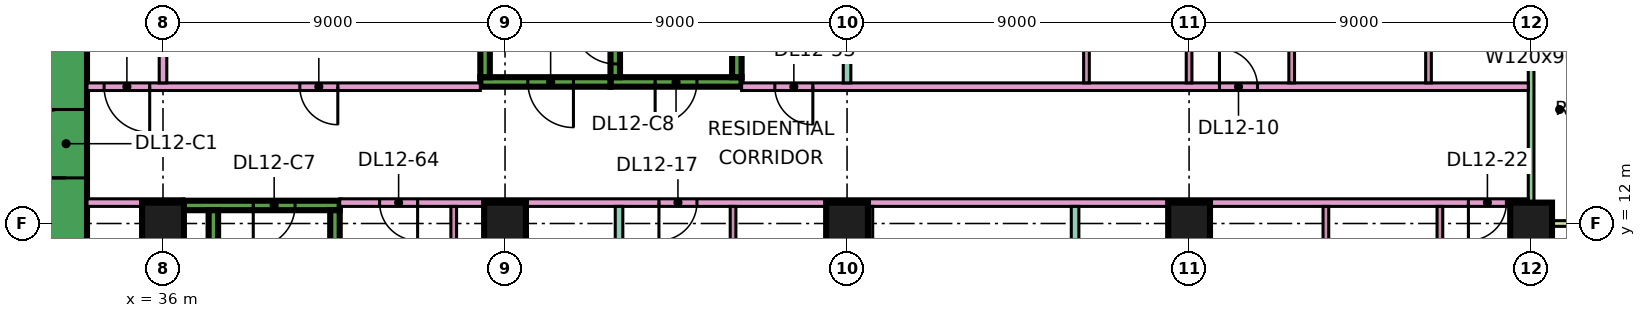
"""IFC4 building model, lengths in metres.
Left out: names, types, materials, properties, quantities, classifications, styles, units other than length and angle.
Written with IfcOpenShell. Run it as: python <this file> out.ifc"""

import sys

from ifc_helpers import new_model, si_unit, direction, frame, frame_2d, origin, origin_2d, place, context, subcontext, project, spatial, rectangle, extrude, element, fill, save


model = new_model("IFC4")
c1 = context("Model", 3, precision=1e-05, world=origin(), true_north=direction((0.0, 1.0)))
c2 = subcontext(c1, "Body", "Model", "MODEL_VIEW")
j1 = project(units=[si_unit("LENGTHUNIT", "METRE"), si_unit("PLANEANGLEUNIT", "RADIAN")], contexts=[c1])
p1 = place(None, origin())
s1 = spatial("IfcSite", under=j1, at=p1, CompositionType="ELEMENT")
p2 = place(p1, origin())
s2 = spatial("IfcBuilding", under=s1, at=p2, CompositionType="ELEMENT")
p3 = place(p2, frame((0.0, 0.0, 60.15)))
s3 = spatial("IfcBuildingStorey", under=s2, at=p3, CompositionType="ELEMENT", Elevation=60.15)
for number, where, z_axis, x_axis in (
    (1, (36.0, 12.0, 0.0), (0.0, 0.0, 1.0), (1.0, 0.0, 0.0)),
    (2, (45.0, 12.0, 0.0), (0.0, 0.0, 1.0), (1.0, 0.0, 0.0)),
    (3, (54.0, 12.0, 0.0), (0.0, 0.0, 1.0), (1.0, 0.0, 0.0)),
    (4, (63.0, 12.0, 0.0), (0.0, 0.0, 1.0), (1.0, 0.0, 0.0)),
    (5, (72.0, 12.0, 0.0), (0.0, 0.0, 1.0), (1.0, 0.0, 0.0)),
):
    element("IfcColumn", number, at=place(p3, frame(where, z_axis=z_axis, x_axis=x_axis)), inside=s3, PredefinedType="COLUMN", context=c2, shape_type="SweptSolid", body=[
        extrude(rectangle(XDim=1.1, YDim=1.1, at=origin_2d()), origin(), (0.0, 0.0, 1.0), 3.75),
    ])
p4 = place(p3, frame((33.45, 8.1, 0.0), z_axis=(0.0, 0.0, 1.0), x_axis=(0.0, 1.0, 0.0)))
e6 = element("IfcWall", 6, at=p4, inside=s3, PredefinedType="SHEAR", context=c2, shape_type="SweptSolid", body=[
    extrude(rectangle(XDim=10.8, YDim=1.1, at=frame_2d((5.4, 0.0))), origin(), (0.0, 0.0, 1.0), 3.75),
])
p5 = place(p4, frame((5.1, 0.0, 0.0)))
e7 = element("IfcOpeningElement", 7, at=p5, cuts=e6, PredefinedType="OPENING", context=c2, shape_type="SweptSolid", body=[
    extrude(rectangle(XDim=1.8, YDim=2.4, at=frame_2d((0.9, 1.2))), frame((0.0, 0.56, 0.0), z_axis=(0.0, -1.0, 0.0), x_axis=(1.0, 0.0, 0.0)), (0.0, 0.0, 1.0), 1.12),
])
p6 = place(p3, frame((36.55, 12.475, 0.0), z_axis=(0.0, 0.0, 1.0), x_axis=(1.0, 0.0, 0.0)))
e8 = element("IfcWall", 8, at=p6, inside=s3, PredefinedType="SHEAR", context=c2, shape_type="SweptSolid", body=[
    extrude(rectangle(XDim=4.1, YDim=0.25, at=frame_2d((2.05, 0.0))), origin(), (0.0, 0.0, 1.0), 3.75),
])
p7 = place(p6, frame((1.825, 0.0, 0.0)))
e9 = element("IfcOpeningElement", 9, at=p7, cuts=e8, PredefinedType="OPENING", context=c2, shape_type="SweptSolid", body=[
    extrude(rectangle(XDim=1.1, YDim=2.2, at=frame_2d((0.55, 1.1))), frame((0.0, 0.135, 0.0), z_axis=(0.0, -1.0, 0.0), x_axis=(1.0, 0.0, 0.0)), (0.0, 0.0, 1.0), 0.27),
])
for number, where, z_axis, x_axis in (
    (10, (37.325, 5.85, 0.0), (0.0, 0.0, 1.0), (0.0, 1.0, 0.0)),
    (11, (40.525, 5.85, 0.0), (0.0, 0.0, 1.0), (0.0, 1.0, 0.0)),
):
    element("IfcWall", number, at=place(p3, frame(where, z_axis=z_axis, x_axis=x_axis)), inside=s3, PredefinedType="SHEAR", context=c2, shape_type="SweptSolid", body=[
        extrude(rectangle(XDim=6.5, YDim=0.25, at=frame_2d((3.25, 0.0))), origin(), (0.0, 0.0, 1.0), 3.75),
    ])
p8 = place(p3, frame((47.775, 15.725, 0.0), z_axis=(0.0, 0.0, 1.0), x_axis=(1.0, 0.0, 0.0)))
e12 = element("IfcWall", 12, at=p8, inside=s3, PredefinedType="SHEAR", context=c2, shape_type="SweptSolid", body=[
    extrude(rectangle(XDim=3.45, YDim=0.25, at=frame_2d((1.725, 0.0))), origin(), (0.0, 0.0, 1.0), 3.75),
])
p9 = place(p8, frame((1.175, 0.0, 0.0)))
e13 = element("IfcOpeningElement", 13, at=p9, cuts=e12, PredefinedType="OPENING", context=c2, shape_type="SweptSolid", body=[
    extrude(rectangle(XDim=1.1, YDim=2.2, at=frame_2d((0.55, 1.1))), frame((0.0, 0.135, 0.0), z_axis=(0.0, -1.0, 0.0), x_axis=(1.0, 0.0, 0.0)), (0.0, 0.0, 1.0), 0.27),
])
p10 = place(p3, frame((47.9, 15.85, 0.0), z_axis=(0.0, 0.0, 1.0), x_axis=(0.0, 1.0, 0.0)))
e14 = element("IfcWall", 14, at=p10, inside=s3, PredefinedType="SHEAR", context=c2, shape_type="SweptSolid", body=[
    extrude(rectangle(XDim=6.5, YDim=0.25, at=frame_2d((3.25, 0.0))), origin(), (0.0, 0.0, 1.0), 3.75),
])
p11 = place(p10, frame((0.35, 0.0, 0.0)))
e15 = element("IfcOpeningElement", 15, at=p11, cuts=e14, PredefinedType="OPENING", context=c2, shape_type="SweptSolid", body=[
    extrude(rectangle(XDim=1.1, YDim=2.2, at=frame_2d((0.55, 1.1))), frame((0.0, 0.135, 0.0), z_axis=(0.0, -1.0, 0.0), x_axis=(1.0, 0.0, 0.0)), (0.0, 0.0, 1.0), 0.27),
])
p12 = place(p3, frame((51.1, 15.85, 0.0), z_axis=(0.0, 0.0, 1.0), x_axis=(0.0, 1.0, 0.0)))
e16 = element("IfcWall", 16, at=p12, inside=s3, PredefinedType="SHEAR", context=c2, shape_type="SweptSolid", body=[
    extrude(rectangle(XDim=6.5, YDim=0.25, at=frame_2d((3.25, 0.0))), origin(), (0.0, 0.0, 1.0), 3.75),
])
p13 = place(p3, frame((44.35, 15.725, 0.0), z_axis=(0.0, 0.0, 1.0), x_axis=(1.0, 0.0, 0.0)))
e17 = element("IfcWall", 17, at=p13, inside=s3, PredefinedType="SHEAR", context=c2, shape_type="SweptSolid", body=[
    extrude(rectangle(XDim=3.425, YDim=0.25, at=frame_2d((1.712, 0.0))), origin(), (0.0, 0.0, 1.0), 3.75),
])
p14 = place(p13, frame((1.25, 0.0, 0.0)))
e18 = element("IfcOpeningElement", 18, at=p14, cuts=e17, PredefinedType="OPENING", context=c2, shape_type="SweptSolid", body=[
    extrude(rectangle(XDim=1.2, YDim=2.2, at=frame_2d((0.6, 1.1))), frame((0.0, 0.135, 0.0), z_axis=(0.0, -1.0, 0.0), x_axis=(1.0, 0.0, 0.0)), (0.0, 0.0, 1.0), 0.27),
])
p15 = place(p3, frame((44.475, 15.85, 0.0), z_axis=(0.0, 0.0, 1.0), x_axis=(0.0, 1.0, 0.0)))
e19 = element("IfcWall", 19, at=p15, inside=s3, PredefinedType="SHEAR", context=c2, shape_type="SweptSolid", body=[
    extrude(rectangle(XDim=6.5, YDim=0.25, at=frame_2d((3.25, 0.0))), origin(), (0.0, 0.0, 1.0), 3.75),
])
p16 = place(p15, frame((1.75, 0.0, 0.0)))
e20 = element("IfcOpeningElement", 20, at=p16, cuts=e19, PredefinedType="OPENING", context=c2, shape_type="SweptSolid", body=[
    extrude(rectangle(XDim=1.1, YDim=2.2, at=frame_2d((0.55, 1.1))), frame((0.0, 0.135, 0.0), z_axis=(0.0, -1.0, 0.0), x_axis=(1.0, 0.0, 0.0)), (0.0, 0.0, 1.0), 0.27),
])
p17 = place(p15, frame((4.3, 0.0, 0.0)))
e21 = element("IfcOpeningElement", 21, at=p17, cuts=e19, PredefinedType="OPENING", context=c2, shape_type="SweptSolid", body=[
    extrude(rectangle(XDim=1.1, YDim=2.2, at=frame_2d((0.55, 1.1))), frame((0.0, 0.135, 0.0), z_axis=(0.0, -1.0, 0.0), x_axis=(1.0, 0.0, 0.0)), (0.0, 0.0, 1.0), 0.27),
])
p18 = place(p3, frame((72.0, 12.075, 0.0), z_axis=(0.0, 0.0, 1.0), x_axis=(0.0, 1.0, 0.0)))
e22 = element("IfcWall", 22, at=p18, inside=s3, PredefinedType="SOLIDWALL", context=c2, shape_type="SweptSolid", body=[
    extrude(rectangle(XDim=10.35, YDim=0.15, at=frame_2d((5.175, 0.0))), origin(), (0.0, 0.0, 1.0), 3.35),
])
p19 = place(p18, frame((4.275, 0.0, 1.7)))
e23 = element("IfcOpeningElement", 23, at=p19, cuts=e22, PredefinedType="OPENING", context=c2, shape_type="SweptSolid", body=[
    extrude(rectangle(XDim=1.2, YDim=0.9, at=frame_2d((0.6, 0.45))), frame((0.0, 0.085, 0.0), z_axis=(0.0, -1.0, 0.0), x_axis=(1.0, 0.0, 0.0)), (0.0, 0.0, 1.0), 0.17),
])
p20 = place(p18, frame((7.988, 0.0, 0.45)))
e24 = element("IfcOpeningElement", 24, at=p20, cuts=e22, PredefinedType="OPENING", context=c2, shape_type="SweptSolid", body=[
    extrude(rectangle(XDim=1.8, YDim=2.4, at=frame_2d((0.9, 1.2))), frame((0.0, 0.085, 0.0), z_axis=(0.0, -1.0, 0.0), x_axis=(1.0, 0.0, 0.0)), (0.0, 0.0, 1.0), 0.17),
])
p21 = place(p3, frame((73.5, 12.0, 0.0), z_axis=(0.0, 0.0, 1.0), x_axis=(-1.0, 0.0, 0.0)))
e25 = element("IfcWall", 25, at=p21, inside=s3, PredefinedType="SOLIDWALL", context=c2, shape_type="SweptSolid", body=[
    extrude(rectangle(XDim=1.5, YDim=0.15, at=frame_2d((0.75, 0.0))), origin(), (0.0, 0.0, 1.0), 3.35),
])
p22 = place(p3, frame((34.0, 12.55, 0.0), z_axis=(0.0, 0.0, 1.0), x_axis=(1.0, 0.0, 0.0)))
e26 = element("IfcWall", 26, at=p22, inside=s3, PredefinedType="PARTITIONING", context=c2, shape_type="SweptSolid", body=[
    extrude(rectangle(XDim=2.551, YDim=0.2, at=frame_2d((1.275, 0.0))), origin(), (0.0, 0.0, 1.0), 3.35),
])
p23 = place(p3, frame((34.0, 15.6, 0.0), z_axis=(0.0, 0.0, 1.0), x_axis=(1.0, 0.0, 0.0)))
e27 = element("IfcWall", 27, at=p23, inside=s3, PredefinedType="PARTITIONING", context=c2, shape_type="SweptSolid", body=[
    extrude(rectangle(XDim=10.35, YDim=0.2, at=frame_2d((5.175, 0.0))), origin(), (0.0, 0.0, 1.0), 3.35),
])
p24 = place(p23, frame((5.6, 0.0, 0.0)))
e28 = element("IfcOpeningElement", 28, at=p24, cuts=e27, PredefinedType="OPENING", context=c2, shape_type="SweptSolid", body=[
    extrude(rectangle(XDim=1.0, YDim=2.1, at=frame_2d((0.5, 1.05))), frame((0.0, 0.11, 0.0), z_axis=(0.0, -1.0, 0.0), x_axis=(1.0, 0.0, 0.0)), (0.0, 0.0, 1.0), 0.22),
])
p25 = place(p23, frame((0.45, 0.0, 0.0)))
e29 = element("IfcOpeningElement", 29, at=p25, cuts=e27, PredefinedType="OPENING", context=c2, shape_type="SweptSolid", body=[
    extrude(rectangle(XDim=1.2, YDim=2.1, at=frame_2d((0.6, 1.05))), frame((0.0, 0.11, 0.0), z_axis=(0.0, -1.0, 0.0), x_axis=(1.0, 0.0, 0.0)), (0.0, 0.0, 1.0), 0.22),
])
p26 = place(p3, frame((36.0, 15.7, 0.0), z_axis=(0.0, 0.0, 1.0), x_axis=(0.0, 1.0, 0.0)))
e30 = element("IfcWall", 30, at=p26, inside=s3, PredefinedType="PARTITIONING", context=c2, shape_type="SweptSolid", body=[
    extrude(rectangle(XDim=8.3, YDim=0.2, at=frame_2d((4.15, 0.0))), origin(), (0.0, 0.0, 1.0), 3.35),
])
p27 = place(p3, frame((40.65, 12.55, 0.0), z_axis=(0.0, 0.0, 1.0), x_axis=(1.0, 0.0, 0.0)))
e31 = element("IfcWall", 31, at=p27, inside=s3, PredefinedType="PARTITIONING", context=c2, shape_type="SweptSolid", body=[
    extrude(rectangle(XDim=31.276, YDim=0.2, at=frame_2d((15.638, 0.0))), origin(), (0.0, 0.0, 1.0), 3.35),
])
p28 = place(p27, frame((8.4, 0.0, 0.0)))
e32 = element("IfcOpeningElement", 32, at=p28, cuts=e31, PredefinedType="OPENING", context=c2, shape_type="SweptSolid", body=[
    extrude(rectangle(XDim=1.0, YDim=2.1, at=frame_2d((0.5, 1.05))), frame((0.0, 0.11, 0.0), z_axis=(0.0, -1.0, 0.0), x_axis=(1.0, 0.0, 0.0)), (0.0, 0.0, 1.0), 0.22),
])
p29 = place(p27, frame((29.7, 0.0, 0.0)))
e33 = element("IfcOpeningElement", 33, at=p29, cuts=e31, PredefinedType="OPENING", context=c2, shape_type="SweptSolid", body=[
    extrude(rectangle(XDim=1.0, YDim=2.1, at=frame_2d((0.5, 1.05))), frame((0.0, 0.11, 0.0), z_axis=(0.0, -1.0, 0.0), x_axis=(1.0, 0.0, 0.0)), (0.0, 0.0, 1.0), 0.22),
])
p30 = place(p27, frame((1.05, 0.0, 0.0)))
e34 = element("IfcOpeningElement", 34, at=p30, cuts=e31, PredefinedType="OPENING", context=c2, shape_type="SweptSolid", body=[
    extrude(rectangle(XDim=1.0, YDim=2.1, at=frame_2d((0.5, 1.05))), frame((0.0, 0.11, 0.0), z_axis=(0.0, -1.0, 0.0), x_axis=(1.0, 0.0, 0.0)), (0.0, 0.0, 1.0), 0.22),
])
p31 = place(p3, frame((43.65, 5.825, 0.0), z_axis=(0.0, 0.0, 1.0), x_axis=(0.0, 1.0, 0.0)))
e35 = element("IfcWall", 35, at=p31, inside=s3, PredefinedType="PARTITIONING", context=c2, shape_type="SweptSolid", body=[
    extrude(rectangle(XDim=6.625, YDim=0.15, at=frame_2d((3.312, 0.0))), origin(), (0.0, 0.0, 1.0), 3.35),
])
p32 = place(p31, frame((4.425, 0.0, 0.0)))
e36 = element("IfcOpeningElement", 36, at=p32, cuts=e35, PredefinedType="OPENING", context=c2, shape_type="SweptSolid", body=[
    extrude(rectangle(XDim=0.9, YDim=2.1, at=frame_2d((0.45, 1.05))), frame((0.0, 0.085, 0.0), z_axis=(0.0, -1.0, 0.0), x_axis=(1.0, 0.0, 0.0)), (0.0, 0.0, 1.0), 0.17),
])
p33 = place(p3, frame((48.0, 5.9, 0.0), z_axis=(0.0, 0.0, 1.0), x_axis=(0.0, 1.0, 0.0)))
e37 = element("IfcWall", 37, at=p33, inside=s3, PredefinedType="PARTITIONING", context=c2, shape_type="SweptSolid", body=[
    extrude(rectangle(XDim=6.55, YDim=0.2, at=frame_2d((3.275, 0.0))), origin(), (0.0, 0.0, 1.0), 3.35),
])
p34 = place(p3, frame((51.0, 7.225, 0.0), z_axis=(0.0, 0.0, 1.0), x_axis=(0.0, 1.0, 0.0)))
e38 = element("IfcWall", 38, at=p34, inside=s3, PredefinedType="PARTITIONING", context=c2, shape_type="SweptSolid", body=[
    extrude(rectangle(XDim=5.225, YDim=0.15, at=frame_2d((2.612, 0.0))), origin(), (0.0, 0.0, 1.0), 3.35),
])
p35 = place(p34, frame((2.175, 0.0, 0.0)))
e39 = element("IfcOpeningElement", 39, at=p35, cuts=e38, PredefinedType="OPENING", context=c2, shape_type="SweptSolid", body=[
    extrude(rectangle(XDim=0.8, YDim=2.1, at=frame_2d((0.4, 1.05))), frame((0.0, 0.085, 0.0), z_axis=(0.0, -1.0, 0.0), x_axis=(1.0, 0.0, 0.0)), (0.0, 0.0, 1.0), 0.17),
])
p36 = place(p3, frame((51.225, 15.6, 0.0), z_axis=(0.0, 0.0, 1.0), x_axis=(1.0, 0.0, 0.0)))
e40 = element("IfcWall", 40, at=p36, inside=s3, PredefinedType="PARTITIONING", context=c2, shape_type="SweptSolid", body=[
    extrude(rectangle(XDim=20.701, YDim=0.2, at=frame_2d((10.351, 0.0))), origin(), (0.0, 0.0, 1.0), 3.35),
])
p37 = place(p36, frame((12.575, 0.0, 0.0)))
e41 = element("IfcOpeningElement", 41, at=p37, cuts=e40, PredefinedType="OPENING", context=c2, shape_type="SweptSolid", body=[
    extrude(rectangle(XDim=1.0, YDim=2.1, at=frame_2d((0.5, 1.05))), frame((0.0, 0.11, 0.0), z_axis=(0.0, -1.0, 0.0), x_axis=(1.0, 0.0, 0.0)), (0.0, 0.0, 1.0), 0.22),
])
p38 = place(p36, frame((0.875, 0.0, 0.0)))
e42 = element("IfcOpeningElement", 42, at=p38, cuts=e40, PredefinedType="OPENING", context=c2, shape_type="SweptSolid", body=[
    extrude(rectangle(XDim=1.0, YDim=2.1, at=frame_2d((0.5, 1.05))), frame((0.0, 0.11, 0.0), z_axis=(0.0, -1.0, 0.0), x_axis=(1.0, 0.0, 0.0)), (0.0, 0.0, 1.0), 0.22),
])
p39 = place(p3, frame((54.0, 15.7, 0.0), z_axis=(0.0, 0.0, 1.0), x_axis=(0.0, 1.0, 0.0)))
e43 = element("IfcWall", 43, at=p39, inside=s3, PredefinedType="PARTITIONING", context=c2, shape_type="SweptSolid", body=[
    extrude(rectangle(XDim=8.3, YDim=0.2, at=frame_2d((4.15, 0.0))), origin(), (0.0, 0.0, 1.0), 3.35),
])
p40 = place(p3, frame((54.6, 7.225, 0.0), z_axis=(0.0, 0.0, 1.0), x_axis=(0.0, 1.0, 0.0)))
e44 = element("IfcWall", 44, at=p40, inside=s3, PredefinedType="PARTITIONING", context=c2, shape_type="SweptSolid", body=[
    extrude(rectangle(XDim=5.225, YDim=0.15, at=frame_2d((2.612, 0.0))), origin(), (0.0, 0.0, 1.0), 3.35),
])
p41 = place(p3, frame((60.0, 0.0, 0.0), z_axis=(0.0, 0.0, 1.0), x_axis=(0.0, 1.0, 0.0)))
e45 = element("IfcWall", 45, at=p41, inside=s3, PredefinedType="PARTITIONING", context=c2, shape_type="SweptSolid", body=[
    extrude(rectangle(XDim=12.45, YDim=0.2, at=frame_2d((6.225, 0.0))), origin(), (0.0, 0.0, 1.0), 3.35),
])
p42 = place(p3, frame((60.3, 15.7, 0.0), z_axis=(0.0, 0.0, 1.0), x_axis=(0.0, 1.0, 0.0)))
e46 = element("IfcWall", 46, at=p42, inside=s3, PredefinedType="PARTITIONING", context=c2, shape_type="SweptSolid", body=[
    extrude(rectangle(XDim=2.525, YDim=0.15, at=frame_2d((1.263, 0.0))), origin(), (0.0, 0.0, 1.0), 3.35),
])
p43 = place(p3, frame((63.0, 15.7, 0.0), z_axis=(0.0, 0.0, 1.0), x_axis=(0.0, 1.0, 0.0)))
e47 = element("IfcWall", 47, at=p43, inside=s3, PredefinedType="PARTITIONING", context=c2, shape_type="SweptSolid", body=[
    extrude(rectangle(XDim=2.525, YDim=0.15, at=frame_2d((1.263, 0.0))), origin(), (0.0, 0.0, 1.0), 3.35),
])
p44 = place(p43, frame((0.9, 0.0, 0.0)))
e48 = element("IfcOpeningElement", 48, at=p44, cuts=e47, PredefinedType="OPENING", context=c2, shape_type="SweptSolid", body=[
    extrude(rectangle(XDim=0.8, YDim=2.1, at=frame_2d((0.4, 1.05))), frame((0.0, 0.085, 0.0), z_axis=(0.0, -1.0, 0.0), x_axis=(1.0, 0.0, 0.0)), (0.0, 0.0, 1.0), 0.17),
])
p45 = place(p3, frame((65.7, 15.7, 0.0), z_axis=(0.0, 0.0, 1.0), x_axis=(0.0, 1.0, 0.0)))
e49 = element("IfcWall", 49, at=p45, inside=s3, PredefinedType="PARTITIONING", context=c2, shape_type="SweptSolid", body=[
    extrude(rectangle(XDim=2.525, YDim=0.15, at=frame_2d((1.263, 0.0))), origin(), (0.0, 0.0, 1.0), 3.35),
])
p46 = place(p3, frame((66.6, 7.825, 0.0), z_axis=(0.0, 0.0, 1.0), x_axis=(0.0, 1.0, 0.0)))
e50 = element("IfcWall", 50, at=p46, inside=s3, PredefinedType="PARTITIONING", context=c2, shape_type="SweptSolid", body=[
    extrude(rectangle(XDim=4.625, YDim=0.15, at=frame_2d((2.312, 0.0))), origin(), (0.0, 0.0, 1.0), 3.35),
])
p47 = place(p3, frame((69.3, 15.7, 0.0), z_axis=(0.0, 0.0, 1.0), x_axis=(0.0, 1.0, 0.0)))
e51 = element("IfcWall", 51, at=p47, inside=s3, PredefinedType="PARTITIONING", context=c2, shape_type="SweptSolid", body=[
    extrude(rectangle(XDim=2.525, YDim=0.15, at=frame_2d((1.263, 0.0))), origin(), (0.0, 0.0, 1.0), 3.35),
])
p48 = place(p3, frame((69.6, 7.825, 0.0), z_axis=(0.0, 0.0, 1.0), x_axis=(0.0, 1.0, 0.0)))
e52 = element("IfcWall", 52, at=p48, inside=s3, PredefinedType="PARTITIONING", context=c2, shape_type="SweptSolid", body=[
    extrude(rectangle(XDim=4.625, YDim=0.15, at=frame_2d((2.312, 0.0))), origin(), (0.0, 0.0, 1.0), 3.35),
])
p49 = place(p19, origin())
e53 = element("IfcWindow", 53, at=p49, inside=s3, PartitioningType="SINGLE_PANEL", PredefinedType="WINDOW", context=c2, shape_type="SweptSolid", body=[
    extrude(rectangle(XDim=1.2, YDim=0.9, at=frame_2d((0.6, 0.45))), frame((0.0, 0.03, 0.0), z_axis=(0.0, -1.0, 0.0), x_axis=(1.0, 0.0, 0.0)), (0.0, 0.0, 1.0), 0.06),
])
fill(e23, e53)
p50 = place(p5, origin())
e54 = element("IfcDoor", 54, at=p50, inside=s3, OperationType="DOUBLE_DOOR_SINGLE_SWING", PredefinedType="DOOR", context=c2, shape_type="SweptSolid", body=[
    extrude(rectangle(XDim=1.8, YDim=2.4, at=frame_2d((0.9, 1.2))), frame((0.0, 0.025, 0.0), z_axis=(0.0, -1.0, 0.0), x_axis=(1.0, 0.0, 0.0)), (0.0, 0.0, 1.0), 0.05),
])
fill(e7, e54)
p51 = place(p7, frame((1.1, 0.0, 0.0), z_axis=(0.0, 0.0, 1.0), x_axis=(-1.0, 0.0, 0.0)))
e55 = element("IfcDoor", 55, at=p51, inside=s3, OperationType="SINGLE_SWING_LEFT", PredefinedType="DOOR", context=c2, shape_type="SweptSolid", body=[
    extrude(rectangle(XDim=1.1, YDim=2.2, at=frame_2d((0.55, 1.1))), frame((0.0, 0.025, 0.0), z_axis=(0.0, -1.0, 0.0), x_axis=(1.0, 0.0, 0.0)), (0.0, 0.0, 1.0), 0.05),
])
fill(e9, e55)
p52 = place(p9, frame((1.1, 0.0, 0.0), z_axis=(0.0, 0.0, 1.0), x_axis=(-1.0, 0.0, 0.0)))
e56 = element("IfcDoor", 56, at=p52, inside=s3, OperationType="SINGLE_SWING_LEFT", PredefinedType="DOOR", context=c2, shape_type="SweptSolid", body=[
    extrude(rectangle(XDim=1.1, YDim=2.2, at=frame_2d((0.55, 1.1))), frame((0.0, 0.025, 0.0), z_axis=(0.0, -1.0, 0.0), x_axis=(1.0, 0.0, 0.0)), (0.0, 0.0, 1.0), 0.05),
])
fill(e13, e56)
p53 = place(p14, origin())
e57 = element("IfcDoor", 57, at=p53, inside=s3, OperationType="SINGLE_SWING_RIGHT", PredefinedType="DOOR", context=c2, shape_type="SweptSolid", body=[
    extrude(rectangle(XDim=1.2, YDim=2.2, at=frame_2d((0.6, 1.1))), frame((0.0, 0.025, 0.0), z_axis=(0.0, -1.0, 0.0), x_axis=(1.0, 0.0, 0.0)), (0.0, 0.0, 1.0), 0.05),
])
fill(e18, e57)
p54 = place(p11, frame((1.1, 0.0, 0.0), z_axis=(0.0, 0.0, 1.0), x_axis=(-1.0, 0.0, 0.0)))
e58 = element("IfcDoor", 58, at=p54, inside=s3, OperationType="SINGLE_SWING_RIGHT", PredefinedType="DOOR", context=c2, shape_type="SweptSolid", body=[
    extrude(rectangle(XDim=1.1, YDim=2.2, at=frame_2d((0.55, 1.1))), frame((0.0, 0.025, 0.0), z_axis=(0.0, -1.0, 0.0), x_axis=(1.0, 0.0, 0.0)), (0.0, 0.0, 1.0), 0.05),
])
fill(e15, e58)
p55 = place(p24, origin())
e59 = element("IfcDoor", 59, at=p55, inside=s3, OperationType="SINGLE_SWING_RIGHT", PredefinedType="DOOR", context=c2, shape_type="SweptSolid", body=[
    extrude(rectangle(XDim=1.0, YDim=2.1, at=frame_2d((0.5, 1.05))), frame((0.0, 0.025, 0.0), z_axis=(0.0, -1.0, 0.0), x_axis=(1.0, 0.0, 0.0)), (0.0, 0.0, 1.0), 0.05),
])
fill(e28, e59)
p56 = place(p37, origin())
e60 = element("IfcDoor", 60, at=p56, inside=s3, OperationType="SINGLE_SWING_LEFT", PredefinedType="DOOR", context=c2, shape_type="SweptSolid", body=[
    extrude(rectangle(XDim=1.0, YDim=2.1, at=frame_2d((0.5, 1.05))), frame((0.0, 0.025, 0.0), z_axis=(0.0, -1.0, 0.0), x_axis=(1.0, 0.0, 0.0)), (0.0, 0.0, 1.0), 0.05),
])
fill(e41, e60)
p57 = place(p28, frame((1.0, 0.0, 0.0), z_axis=(0.0, 0.0, 1.0), x_axis=(-1.0, 0.0, 0.0)))
e61 = element("IfcDoor", 61, at=p57, inside=s3, OperationType="SINGLE_SWING_LEFT", PredefinedType="DOOR", context=c2, shape_type="SweptSolid", body=[
    extrude(rectangle(XDim=1.0, YDim=2.1, at=frame_2d((0.5, 1.05))), frame((0.0, 0.025, 0.0), z_axis=(0.0, -1.0, 0.0), x_axis=(1.0, 0.0, 0.0)), (0.0, 0.0, 1.0), 0.05),
])
fill(e32, e61)
p58 = place(p29, frame((1.0, 0.0, 0.0), z_axis=(0.0, 0.0, 1.0), x_axis=(-1.0, 0.0, 0.0)))
e62 = element("IfcDoor", 62, at=p58, inside=s3, OperationType="SINGLE_SWING_LEFT", PredefinedType="DOOR", context=c2, shape_type="SweptSolid", body=[
    extrude(rectangle(XDim=1.0, YDim=2.1, at=frame_2d((0.5, 1.05))), frame((0.0, 0.025, 0.0), z_axis=(0.0, -1.0, 0.0), x_axis=(1.0, 0.0, 0.0)), (0.0, 0.0, 1.0), 0.05),
])
fill(e33, e62)
p59 = place(p25, origin())
e63 = element("IfcDoor", 63, at=p59, inside=s3, OperationType="SINGLE_SWING_RIGHT", PredefinedType="DOOR", context=c2, shape_type="SweptSolid", body=[
    extrude(rectangle(XDim=1.2, YDim=2.1, at=frame_2d((0.6, 1.05))), frame((0.0, 0.025, 0.0), z_axis=(0.0, -1.0, 0.0), x_axis=(1.0, 0.0, 0.0)), (0.0, 0.0, 1.0), 0.05),
])
fill(e29, e63)
p60 = place(p38, origin())
e64 = element("IfcDoor", 64, at=p60, inside=s3, OperationType="SINGLE_SWING_RIGHT", PredefinedType="DOOR", context=c2, shape_type="SweptSolid", body=[
    extrude(rectangle(XDim=1.0, YDim=2.1, at=frame_2d((0.5, 1.05))), frame((0.0, 0.025, 0.0), z_axis=(0.0, -1.0, 0.0), x_axis=(1.0, 0.0, 0.0)), (0.0, 0.0, 1.0), 0.05),
])
fill(e42, e64)
p61 = place(p30, origin())
e65 = element("IfcDoor", 65, at=p61, inside=s3, OperationType="SINGLE_SWING_RIGHT", PredefinedType="DOOR", context=c2, shape_type="SweptSolid", body=[
    extrude(rectangle(XDim=1.0, YDim=2.1, at=frame_2d((0.5, 1.05))), frame((0.0, 0.025, 0.0), z_axis=(0.0, -1.0, 0.0), x_axis=(1.0, 0.0, 0.0)), (0.0, 0.0, 1.0), 0.05),
])
fill(e34, e65)
save(model, sys.argv[1])
